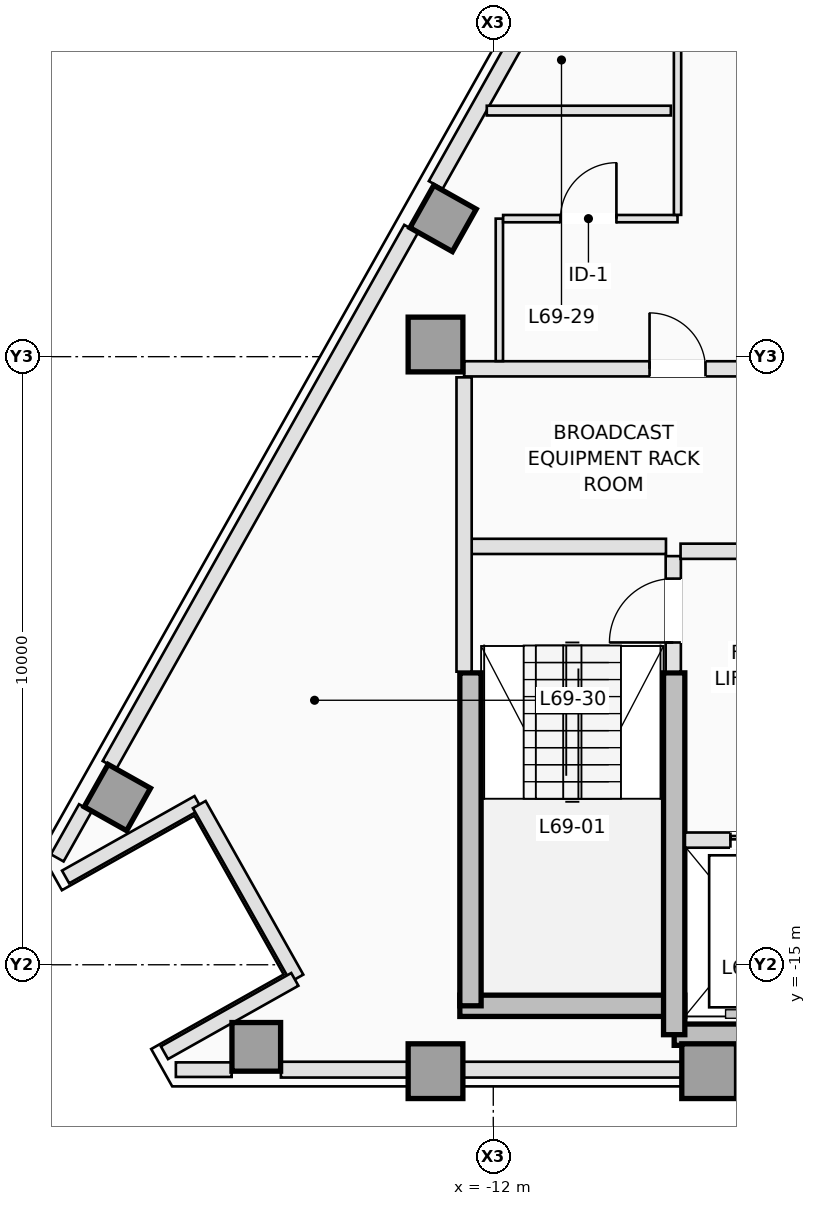
"""IFC4 building model, lengths in metres.
Left out: names, types, materials, properties, quantities, classifications, styles, units other than length and angle.
Written with IfcOpenShell. Run it as: python <this file> out.ifc"""

import sys

from ifc_helpers import new_model, si_unit, direction, frame, frame_2d, origin, origin_2d, place, context, subcontext, project, spatial, rectangle, extrude, element, fill, save


model = new_model("IFC4")
c1 = context("Model", 3, precision=1e-05, world=origin(), true_north=direction((0.0, 1.0)))
c2 = subcontext(c1, "Body", "Model", "MODEL_VIEW")
j1 = project(units=[si_unit("LENGTHUNIT", "METRE"), si_unit("PLANEANGLEUNIT", "RADIAN")], contexts=[c1])
p1 = place(None, origin())
s1 = spatial("IfcSite", under=j1, at=p1, CompositionType="ELEMENT")
p2 = place(p1, origin())
s2 = spatial("IfcBuilding", under=s1, at=p2, CompositionType="ELEMENT")
p3 = place(p2, frame((0.0, 0.0, 249.9)))
s3 = spatial("IfcBuildingStorey", under=s2, at=p3, CompositionType="ELEMENT", Elevation=249.9)
p4 = place(p3, frame((-12.55, -15.675, 0.0), z_axis=(0.0, 0.0, 1.0), x_axis=(1.0, 0.0, 0.0)))
e1 = element("IfcWall", 1, at=p4, inside=s3, PredefinedType="SHEAR", context=c2, shape_type="SweptSolid", body=[
    extrude(rectangle(XDim=3.7, YDim=0.35, at=frame_2d((1.85, 0.0))), origin(), (0.0, 0.0, 1.0), 3.5),
])
p5 = place(p3, frame((-9.025, -16.15, 0.0), z_axis=(0.0, 0.0, 1.0), x_axis=(1.0, 0.0, 0.0)))
e2 = element("IfcWall", 2, at=p5, inside=s3, PredefinedType="SHEAR", context=c2, shape_type="SweptSolid", body=[
    extrude(rectangle(XDim=5.275, YDim=0.35, at=frame_2d((2.637, 0.0))), origin(), (0.0, 0.0, 1.0), 3.5),
])
p6 = place(p3, frame((-12.375, -15.675, 0.0), z_axis=(0.0, 0.0, 1.0), x_axis=(0.0, 1.0, 0.0)))
e3 = element("IfcWall", 3, at=p6, inside=s3, PredefinedType="SHEAR", context=c2, shape_type="SweptSolid", body=[
    extrude(rectangle(XDim=5.475, YDim=0.35, at=frame_2d((2.738, 0.0))), origin(), (0.0, 0.0, 1.0), 3.5),
])
p7 = place(p3, frame((-9.025, -16.15, 0.0), z_axis=(0.0, 0.0, 1.0), x_axis=(0.0, 1.0, 0.0)))
e4 = element("IfcWall", 4, at=p7, inside=s3, PredefinedType="SHEAR", context=c2, shape_type="SweptSolid", body=[
    extrude(rectangle(XDim=5.95, YDim=0.35, at=frame_2d((2.975, 0.0))), origin(), (0.0, 0.0, 1.0), 3.5),
])
for number, where, z_axis, x_axis in (
    (5, (-12.95, -16.75, 0.0), (0.0, 0.0, 1.0), (1.0, 0.0, 0.0)),
    (6, (-8.45, -16.75, 0.0), (0.0, 0.0, 1.0), (1.0, 0.0, 0.0)),
    (7, (-12.95, -4.8, 0.0), (0.0, 0.0, 1.0), (1.0, 0.0, 0.0)),
):
    element("IfcColumn", number, at=place(p3, frame(where, z_axis=z_axis, x_axis=x_axis)), inside=s3, PredefinedType="COLUMN", context=c2, shape_type="SweptSolid", body=[
        extrude(rectangle(XDim=0.9, YDim=0.9, at=origin_2d()), origin(), (0.0, 0.0, 1.0), 3.5),
    ])
for number, where, z_axis, x_axis in (
    (8, (-15.898, -16.35, 0.0), (0.0, 0.0, 1.0), (0.0, 1.0, 0.0)),
    (9, (-12.825, -2.727, 0.0), (0.0, 0.0, 1.0), (-0.872, 0.49, 0.0)),
    (10, (-18.182, -12.25, 0.0), (0.0, 0.0, 1.0), (-0.872, 0.49, 0.0)),
):
    element("IfcColumn", number, at=place(p3, frame(where, z_axis=z_axis, x_axis=x_axis)), inside=s3, PredefinedType="COLUMN", context=c2, shape_type="SweptSolid", body=[
        extrude(rectangle(XDim=0.8, YDim=0.8, at=origin_2d()), origin(), (0.0, 0.0, 1.0), 3.5),
    ])
p8 = place(p3, frame((-16.302, -16.725, 0.0), z_axis=(0.0, 0.0, 1.0), x_axis=(-1.0, 0.0, 0.0)))
e11 = element("IfcWall", 11, at=p8, inside=s3, PredefinedType="STANDARD", context=c2, shape_type="SweptSolid", body=[
    extrude(rectangle(XDim=0.917, YDim=0.24, at=frame_2d((0.459, 0.0))), origin(), (0.0, 0.0, 1.0), 3.25),
])
p9 = place(p3, frame((-4.22, -16.725, 0.0), z_axis=(0.0, 0.0, 1.0), x_axis=(-1.0, 0.0, 0.0)))
e12 = element("IfcWall", 12, at=p9, inside=s3, PredefinedType="STANDARD", context=c2, shape_type="SweptSolid", body=[
    extrude(rectangle(XDim=11.273, YDim=0.26, at=frame_2d((5.636, 0.0))), origin(), (0.0, 0.0, 1.0), 2.79),
])
p10 = place(p3, frame((-19.171, -13.242, 0.0), z_axis=(0.0, 0.0, 1.0), x_axis=(0.490199895283, 0.871610040479, 0.0)))
e13 = element("IfcWall", 13, at=p10, inside=s3, PredefinedType="STANDARD", context=c2, shape_type="SweptSolid", body=[
    extrude(rectangle(XDim=0.945, YDim=0.24, at=frame_2d((0.472, 0.0))), origin(), (0.0, 0.0, 1.0), 3.25),
])
p11 = place(p3, frame((-18.311, -11.713, 0.0), z_axis=(0.0, 0.0, 1.0), x_axis=(0.490266968583, 0.871572314565, 0.0)))
e14 = element("IfcWall", 14, at=p11, inside=s3, PredefinedType="STANDARD", context=c2, shape_type="SweptSolid", body=[
    extrude(rectangle(XDim=10.116, YDim=0.26, at=frame_2d((5.058, 0.0))), origin(), (0.0, 0.0, 1.0), 3.25),
])
p12 = place(p3, frame((-12.946, -2.177, 0.0), z_axis=(0.0, 0.0, 1.0), x_axis=(0.490244825075, 0.871584770109, 0.0)))
e15 = element("IfcWall", 15, at=p12, inside=s3, PredefinedType="STANDARD", context=c2, shape_type="SweptSolid", body=[
    extrude(rectangle(XDim=4.237, YDim=0.26, at=frame_2d((2.119, 0.0))), origin(), (0.0, 0.0, 1.0), 3.25),
])
p13 = place(p3, frame((-19.033, -13.556, 0.0), z_axis=(0.0, 0.0, 1.0), x_axis=(0.871588577066, 0.490238056792, 0.0)))
e16 = element("IfcWall", 16, at=p13, inside=s3, PredefinedType="STANDARD", context=c2, shape_type="SweptSolid", body=[
    extrude(rectangle(XDim=2.5, YDim=0.24, at=frame_2d((1.25, 0.0))), origin(), (0.0, 0.0, 1.0), 3.25),
])
p14 = place(p3, frame((-16.835, -12.366, 0.0), z_axis=(0.0, 0.0, 1.0), x_axis=(0.490293083368, -0.871557624258, 0.0)))
e17 = element("IfcWall", 17, at=p14, inside=s3, PredefinedType="STANDARD", context=c2, shape_type="SweptSolid", body=[
    extrude(rectangle(XDim=3.276, YDim=0.24, at=frame_2d((1.638, 0.0))), origin(), (0.0, 0.0, 1.0), 2.79),
])
p15 = place(p3, frame((-15.264, -15.24, 0.0), z_axis=(0.0, 0.0, 1.0), x_axis=(-0.87157023615, -0.490270663468, 0.0)))
e18 = element("IfcWall", 18, at=p15, inside=s3, PredefinedType="STANDARD", context=c2, shape_type="SweptSolid", body=[
    extrude(rectangle(XDim=2.46, YDim=0.24, at=frame_2d((1.23, 0.0))), origin(), (0.0, 0.0, 1.0), 3.25),
])
p16 = place(p3, frame((-9.04, -10.18, 0.0), z_axis=(0.0, 0.0, 1.0), x_axis=(0.0, 1.0, 0.0)))
e19 = element("IfcWall", 19, at=p16, inside=s3, PredefinedType="PARTITIONING", context=c2, shape_type="SweptSolid", body=[
    extrude(rectangle(XDim=1.9, YDim=0.25, at=frame_2d((0.95, 0.0))), origin(), (0.0, 0.0, 1.0), 3.25),
])
p17 = place(p16, frame((0.48, 0.0, 0.0)))
e20 = element("IfcOpeningElement", 20, at=p17, cuts=e19, PredefinedType="OPENING", context=c2, shape_type="SweptSolid", body=[
    extrude(rectangle(XDim=1.05, YDim=2.15, at=frame_2d((0.525, 1.075))), frame((0.0, 0.135, 0.0), z_axis=(0.0, -1.0, 0.0), x_axis=(1.0, 0.0, 0.0)), (0.0, 0.0, 1.0), 0.27),
])
p18 = place(p3, frame((-12.38, -8.12, 0.0), z_axis=(0.0, 0.0, 1.0), x_axis=(1.0, 0.0, 0.0)))
e21 = element("IfcWall", 21, at=p18, inside=s3, PredefinedType="PARTITIONING", context=c2, shape_type="SweptSolid", body=[
    extrude(rectangle(XDim=3.22, YDim=0.25, at=frame_2d((1.61, 0.0))), origin(), (0.0, 0.0, 1.0), 3.25),
])
p19 = place(p3, frame((-12.48, -10.18, 0.0), z_axis=(0.0, 0.0, 1.0), x_axis=(0.0, 1.0, 0.0)))
e22 = element("IfcWall", 22, at=p19, inside=s3, PredefinedType="PARTITIONING", context=c2, shape_type="SweptSolid", body=[
    extrude(rectangle(XDim=4.84, YDim=0.25, at=frame_2d((2.42, 0.0))), origin(), (0.0, 0.0, 1.0), 3.25),
])
p20 = place(p3, frame((-8.848, -12.95, 0.0), z_axis=(0.0, 0.0, 1.0), x_axis=(1.0, 0.0, 0.0)))
e23 = element("IfcWall", 23, at=p20, inside=s3, PredefinedType="PARTITIONING", context=c2, shape_type="SweptSolid", body=[
    extrude(rectangle(XDim=5.168, YDim=0.25, at=frame_2d((2.584, 0.0))), origin(), (0.0, 0.0, 1.0), 3.25),
])
p21 = place(p20, frame((0.748, 0.0, 0.0)))
e24 = element("IfcOpeningElement", 24, at=p21, cuts=e23, PredefinedType="OPENING", context=c2, shape_type="SweptSolid", body=[
    extrude(rectangle(XDim=1.1, YDim=2.15, at=frame_2d((0.55, 1.075))), frame((0.0, 0.135, 0.0), z_axis=(0.0, -1.0, 0.0), x_axis=(1.0, 0.0, 0.0)), (0.0, 0.0, 1.0), 0.27),
])
p22 = place(p20, frame((2.648, 0.0, 0.0)))
e25 = element("IfcOpeningElement", 25, at=p22, cuts=e23, PredefinedType="OPENING", context=c2, shape_type="SweptSolid", body=[
    extrude(rectangle(XDim=0.88, YDim=2.1, at=frame_2d((0.44, 1.05))), frame((0.0, 0.135, 0.0), z_axis=(0.0, -1.0, 0.0), x_axis=(1.0, 0.0, 0.0)), (0.0, 0.0, 1.0), 0.27),
])
p23 = place(p20, frame((4.048, 0.0, 0.0)))
e26 = element("IfcOpeningElement", 26, at=p23, cuts=e23, PredefinedType="OPENING", context=c2, shape_type="SweptSolid", body=[
    extrude(rectangle(XDim=0.88, YDim=2.1, at=frame_2d((0.44, 1.05))), frame((0.0, 0.135, 0.0), z_axis=(0.0, -1.0, 0.0), x_axis=(1.0, 0.0, 0.0)), (0.0, 0.0, 1.0), 0.27),
])
p24 = place(p3, frame((-8.92, -8.2, 0.0), z_axis=(0.0, 0.0, 1.0), x_axis=(1.0, 0.0, 0.0)))
e27 = element("IfcWall", 27, at=p24, inside=s3, PredefinedType="PARTITIONING", context=c2, shape_type="SweptSolid", body=[
    extrude(rectangle(XDim=5.24, YDim=0.25, at=frame_2d((2.62, 0.0))), origin(), (0.0, 0.0, 1.0), 3.25),
])
p25 = place(p3, frame((-12.48, -5.2, 0.0), z_axis=(0.0, 0.0, 1.0), x_axis=(1.0, 0.0, 0.0)))
e28 = element("IfcWall", 28, at=p25, inside=s3, PredefinedType="PARTITIONING", context=c2, shape_type="SweptSolid", body=[
    extrude(rectangle(XDim=8.278, YDim=0.25, at=frame_2d((4.139, 0.0))), origin(), (0.0, 0.0, 1.0), 3.25),
])
p26 = place(p25, frame((3.05, 0.0, 0.0)))
e29 = element("IfcOpeningElement", 29, at=p26, cuts=e28, PredefinedType="OPENING", context=c2, shape_type="SweptSolid", body=[
    extrude(rectangle(XDim=0.92, YDim=2.12, at=frame_2d((0.46, 1.06))), frame((0.0, 0.135, 0.0), z_axis=(0.0, -1.0, 0.0), x_axis=(1.0, 0.0, 0.0)), (0.0, 0.0, 1.0), 0.27),
])
p27 = place(p25, frame((6.15, 0.0, 0.0)))
e30 = element("IfcOpeningElement", 30, at=p27, cuts=e28, PredefinedType="OPENING", context=c2, shape_type="SweptSolid", body=[
    extrude(rectangle(XDim=0.92, YDim=2.12, at=frame_2d((0.46, 1.06))), frame((0.0, 0.135, 0.0), z_axis=(0.0, -1.0, 0.0), x_axis=(1.0, 0.0, 0.0)), (0.0, 0.0, 1.0), 0.27),
])
p28 = place(p3, frame((-11.9, -5.073, 0.0), z_axis=(0.0, 0.0, 1.0), x_axis=(0.0, 1.0, 0.0)))
e31 = element("IfcWall", 31, at=p28, inside=s3, PredefinedType="PARTITIONING", context=c2, shape_type="SweptSolid", body=[
    extrude(rectangle(XDim=2.343, YDim=0.12, at=frame_2d((1.171, 0.0))), origin(), (0.0, 0.0, 1.0), 3.25),
])
p29 = place(p3, frame((-11.838, -2.73, 0.0), z_axis=(0.0, 0.0, 1.0), x_axis=(1.0, 0.0, 0.0)))
e32 = element("IfcWall", 32, at=p29, inside=s3, PredefinedType="PARTITIONING", context=c2, shape_type="SweptSolid", body=[
    extrude(rectangle(XDim=2.868, YDim=0.12, at=frame_2d((1.434, 0.0))), origin(), (0.0, 0.0, 1.0), 3.25),
])
p30 = place(p29, frame((0.943, 0.0, 0.0)))
e33 = element("IfcOpeningElement", 33, at=p30, cuts=e32, PredefinedType="OPENING", context=c2, shape_type="SweptSolid", body=[
    extrude(rectangle(XDim=0.92, YDim=2.12, at=frame_2d((0.46, 1.06))), frame((0.0, 0.07, 0.0), z_axis=(0.0, -1.0, 0.0), x_axis=(1.0, 0.0, 0.0)), (0.0, 0.0, 1.0), 0.14),
])
p31 = place(p3, frame((-8.97, -2.668, 0.0), z_axis=(0.0, 0.0, 1.0), x_axis=(0.0, 1.0, 0.0)))
e34 = element("IfcWall", 34, at=p31, inside=s3, PredefinedType="PARTITIONING", context=c2, shape_type="SweptSolid", body=[
    extrude(rectangle(XDim=5.286, YDim=0.12, at=frame_2d((2.643, 0.0))), origin(), (0.0, 0.0, 1.0), 3.25),
])
p32 = place(p31, frame((2.791, 0.0, 0.0)))
e35 = element("IfcOpeningElement", 35, at=p32, cuts=e34, PredefinedType="OPENING", context=c2, shape_type="SweptSolid", body=[
    extrude(rectangle(XDim=0.92, YDim=2.12, at=frame_2d((0.46, 1.06))), frame((0.0, 0.07, 0.0), z_axis=(0.0, -1.0, 0.0), x_axis=(1.0, 0.0, 0.0)), (0.0, 0.0, 1.0), 0.14),
])
p33 = place(p3, frame((-9.08, -0.953, 0.0), z_axis=(0.0, 0.0, 1.0), x_axis=(-1.0, 0.0, 0.0)))
e36 = element("IfcWall", 36, at=p33, inside=s3, PredefinedType="PARTITIONING", context=c2, shape_type="SweptSolid", body=[
    extrude(rectangle(XDim=3.027, YDim=0.16, at=frame_2d((1.513, 0.0))), origin(), (0.0, 0.0, 1.0), 3.25),
])
p34 = place(p21, origin())
e37 = element("IfcDoor", 37, at=p34, inside=s3, OperationType="SLIDING_TO_LEFT", PredefinedType="DOOR", context=c2, shape_type="SweptSolid", body=[
    extrude(rectangle(XDim=1.1, YDim=2.15, at=frame_2d((0.55, 1.075))), frame((0.0, 0.025, 0.0), z_axis=(0.0, -1.0, 0.0), x_axis=(1.0, 0.0, 0.0)), (0.0, 0.0, 1.0), 0.05),
])
fill(e24, e37)
p35 = place(p17, origin())
e38 = element("IfcDoor", 38, at=p35, inside=s3, OperationType="SINGLE_SWING_LEFT", PredefinedType="DOOR", context=c2, shape_type="SweptSolid", body=[
    extrude(rectangle(XDim=1.05, YDim=2.15, at=frame_2d((0.525, 1.075))), frame((0.0, 0.025, 0.0), z_axis=(0.0, -1.0, 0.0), x_axis=(1.0, 0.0, 0.0)), (0.0, 0.0, 1.0), 0.05),
])
fill(e20, e38)
p36 = place(p26, origin())
e39 = element("IfcDoor", 39, at=p36, inside=s3, OperationType="SINGLE_SWING_LEFT", PredefinedType="DOOR", context=c2, shape_type="SweptSolid", body=[
    extrude(rectangle(XDim=0.92, YDim=2.12, at=frame_2d((0.46, 1.06))), frame((0.0, 0.025, 0.0), z_axis=(0.0, -1.0, 0.0), x_axis=(1.0, 0.0, 0.0)), (0.0, 0.0, 1.0), 0.05),
])
fill(e29, e39)
p37 = place(p30, origin())
e40 = element("IfcDoor", 40, at=p37, inside=s3, OperationType="SINGLE_SWING_RIGHT", PredefinedType="DOOR", context=c2, shape_type="SweptSolid", body=[
    extrude(rectangle(XDim=0.92, YDim=2.12, at=frame_2d((0.46, 1.06))), frame((0.0, 0.025, 0.0), z_axis=(0.0, -1.0, 0.0), x_axis=(1.0, 0.0, 0.0)), (0.0, 0.0, 1.0), 0.05),
])
fill(e33, e40)
save(model, sys.argv[1])
